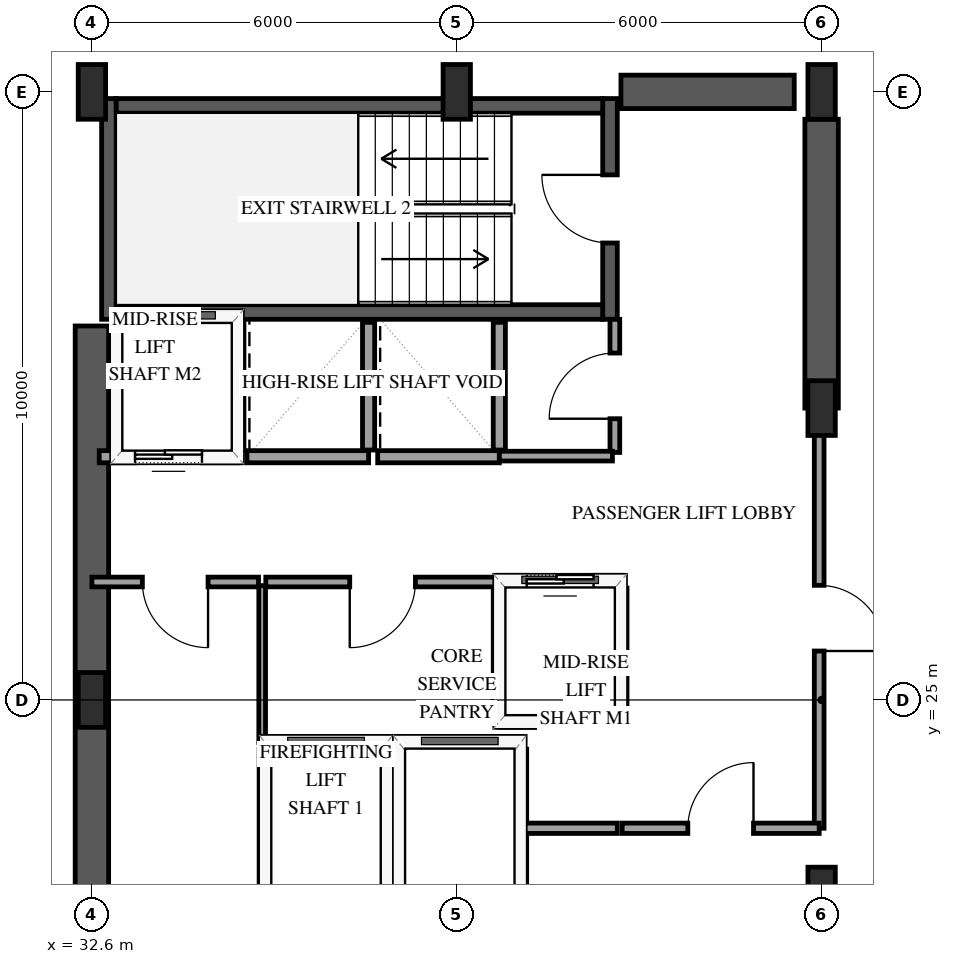
"""IFC4 building model, lengths in metres.
Left out: names, types, materials, properties, quantities, classifications, styles, units other than length and angle.
Written with IfcOpenShell. Run it as: python <this file> out.ifc"""

import sys

from ifc_helpers import new_model, si_unit, direction, frame, frame_2d, origin, origin_2d, place, context, subcontext, project, spatial, rectangle, extrude, element, fill, save


model = new_model("IFC4")
c1 = context("Model", 3, precision=1e-05, world=origin(), true_north=direction((0.0, 1.0)))
c2 = subcontext(c1, "Body", "Model", "MODEL_VIEW")
j1 = project(units=[si_unit("LENGTHUNIT", "METRE"), si_unit("PLANEANGLEUNIT", "RADIAN")], contexts=[c1])
p1 = place(None, origin())
s1 = spatial("IfcSite", under=j1, at=p1, CompositionType="ELEMENT")
p2 = place(p1, origin())
s2 = spatial("IfcBuilding", under=s1, at=p2, CompositionType="ELEMENT")
p3 = place(p2, frame((0.0, 0.0, 178.6)))
s3 = spatial("IfcBuildingStorey", under=s2, at=p3, CompositionType="ELEMENT", Elevation=178.6)
p4 = place(p3, frame((32.88, 31.26, 0.0), z_axis=(0.0, 0.0, 1.0), x_axis=(0.0, 1.0, 0.0)))
e1 = element("IfcWall", 1, at=p4, inside=s3, PredefinedType="SHEAR", context=c2, shape_type="SweptSolid", body=[
    extrude(rectangle(XDim=3.63, YDim=0.24, at=frame_2d((1.815, 0.0))), origin(), (0.0, 0.0, 1.0), 3.6),
])
p5 = place(p3, frame((41.12, 31.26, 0.0), z_axis=(0.0, 0.0, 1.0), x_axis=(0.0, 1.0, 0.0)))
e2 = element("IfcWall", 2, at=p5, inside=s3, PredefinedType="SHEAR", context=c2, shape_type="SweptSolid", body=[
    extrude(rectangle(XDim=3.63, YDim=0.24, at=frame_2d((1.815, 0.0))), origin(), (0.0, 0.0, 1.0), 3.6),
])
p6 = place(p5, frame((1.255, 0.0, 0.0)))
e3 = element("IfcOpeningElement", 3, at=p6, cuts=e2, PredefinedType="OPENING", context=c2, shape_type="SweptSolid", body=[
    extrude(rectangle(XDim=1.12, YDim=2.15, at=frame_2d((0.56, 1.075))), frame((0.0, 0.13, 0.0), z_axis=(0.0, -1.0, 0.0), x_axis=(1.0, 0.0, 0.0)), (0.0, 0.0, 1.0), 0.26),
])
for number, where, z_axis, x_axis in (
    (4, (33.0, 31.38, 0.0), (0.0, 0.0, 1.0), (1.0, 0.0, 0.0)),
    (5, (33.0, 34.77, 0.0), (0.0, 0.0, 1.0), (1.0, 0.0, 0.0)),
):
    element("IfcWall", number, at=place(p3, frame(where, z_axis=z_axis, x_axis=x_axis)), inside=s3, PredefinedType="SHEAR", context=c2, shape_type="SweptSolid", body=[
        extrude(rectangle(XDim=8.0, YDim=0.24, at=frame_2d((4.0, 0.0))), origin(), (0.0, 0.0, 1.0), 3.6),
    ])
p7 = place(p3, frame((32.6, 18.85, 0.0), z_axis=(0.0, 0.0, 1.0), x_axis=(0.0, 1.0, 0.0)))
e6 = element("IfcWall", 6, at=p7, inside=s3, PredefinedType="SHEAR", context=c2, shape_type="SweptSolid", body=[
    extrude(rectangle(XDim=12.3, YDim=0.55, at=frame_2d((6.15, 0.0))), origin(), (0.0, 0.0, 1.0), 3.6),
])
p8 = place(p3, frame((41.3, 35.0, 0.0), z_axis=(0.0, 0.0, 1.0), x_axis=(1.0, 0.0, 0.0)))
e7 = element("IfcWall", 7, at=p8, inside=s3, PredefinedType="SHEAR", context=c2, shape_type="SweptSolid", body=[
    extrude(rectangle(XDim=2.85, YDim=0.55, at=frame_2d((1.425, 0.0))), origin(), (0.0, 0.0, 1.0), 3.6),
])
p9 = place(p3, frame((44.6, 29.8, 0.0), z_axis=(0.0, 0.0, 1.0), x_axis=(0.0, 1.0, 0.0)))
e8 = element("IfcWall", 8, at=p9, inside=s3, PredefinedType="SHEAR", context=c2, shape_type="SweptSolid", body=[
    extrude(rectangle(XDim=4.75, YDim=0.55, at=frame_2d((2.375, 0.0))), origin(), (0.0, 0.0, 1.0), 3.6),
])
for number, where, z_axis, x_axis in (
    (9, (32.6, 25.0, 0.0), (0.0, 0.0, 1.0), (1.0, 0.0, 0.0)),
    (10, (32.6, 35.0, 0.0), (0.0, 0.0, 1.0), (1.0, 0.0, 0.0)),
    (11, (38.6, 35.0, 0.0), (0.0, 0.0, 1.0), (1.0, 0.0, 0.0)),
    (12, (44.6, 21.8, 0.0), (0.0, 0.0, 1.0), (1.0, 0.0, 0.0)),
    (13, (44.6, 29.8, 0.0), (0.0, 0.0, 1.0), (1.0, 0.0, 0.0)),
    (14, (44.6, 35.0, 0.0), (0.0, 0.0, 1.0), (1.0, 0.0, 0.0)),
):
    element("IfcColumn", number, at=place(p3, frame(where, z_axis=z_axis, x_axis=x_axis)), inside=s3, PredefinedType="PILASTER", context=c2, shape_type="SweptSolid", body=[
        extrude(rectangle(XDim=0.45, YDim=0.9, at=origin_2d()), origin(), (0.0, 0.0, 1.0), 3.6),
    ])
p10 = place(p3, frame((35.45, 24.3, 0.0), z_axis=(0.0, 0.0, 1.0), x_axis=(1.0, 0.0, 0.0)))
e15 = element("IfcWall", 15, at=p10, inside=s3, PredefinedType="SOLIDWALL", context=c2, shape_type="SweptSolid", body=[
    extrude(rectangle(XDim=2.0, YDim=0.2, at=frame_2d((1.0, 0.0))), origin(), (0.0, 0.0, 1.0), 3.3),
])
for number, where, z_axis, x_axis in (
    (16, (35.45, 21.81, 0.0), (0.0, 0.0, 1.0), (0.0, 1.0, 0.0)),
    (17, (37.45, 21.81, 0.0), (0.0, 0.0, 1.0), (0.0, 1.0, 0.0)),
):
    element("IfcWall", number, at=place(p3, frame(where, z_axis=z_axis, x_axis=x_axis)), inside=s3, PredefinedType="SOLIDWALL", context=c2, shape_type="SweptSolid", body=[
        extrude(rectangle(XDim=2.38, YDim=0.2, at=frame_2d((1.19, 0.0))), origin(), (0.0, 0.0, 1.0), 3.3),
    ])
p11 = place(p3, frame((37.65, 24.3, 0.0), z_axis=(0.0, 0.0, 1.0), x_axis=(1.0, 0.0, 0.0)))
e18 = element("IfcWall", 18, at=p11, inside=s3, PredefinedType="SOLIDWALL", context=c2, shape_type="SweptSolid", body=[
    extrude(rectangle(XDim=2.0, YDim=0.2, at=frame_2d((1.0, 0.0))), origin(), (0.0, 0.0, 1.0), 3.3),
])
p12 = place(p3, frame((39.65, 21.81, 0.0), z_axis=(0.0, 0.0, 1.0), x_axis=(0.0, 1.0, 0.0)))
e19 = element("IfcWall", 19, at=p12, inside=s3, PredefinedType="SOLIDWALL", context=c2, shape_type="SweptSolid", body=[
    extrude(rectangle(XDim=2.38, YDim=0.2, at=frame_2d((1.19, 0.0))), origin(), (0.0, 0.0, 1.0), 3.3),
])
p13 = place(p3, frame((39.3, 24.65, 0.0), z_axis=(0.0, 0.0, 1.0), x_axis=(1.0, 0.0, 0.0)))
e20 = element("IfcWall", 20, at=p13, inside=s3, PredefinedType="SOLIDWALL", context=c2, shape_type="SweptSolid", body=[
    extrude(rectangle(XDim=2.0, YDim=0.2, at=frame_2d((1.0, 0.0))), origin(), (0.0, 0.0, 1.0), 3.3),
])
p14 = place(p3, frame((39.3, 26.95, 0.0), z_axis=(0.0, 0.0, 1.0), x_axis=(1.0, 0.0, 0.0)))
e21 = element("IfcWall", 21, at=p14, inside=s3, PredefinedType="SOLIDWALL", context=c2, shape_type="SweptSolid", body=[
    extrude(rectangle(XDim=2.0, YDim=0.2, at=frame_2d((1.0, 0.0))), origin(), (0.0, 0.0, 1.0), 3.3),
])
p15 = place(p14, frame((0.45, 0.0, 0.0)))
e22 = element("IfcOpeningElement", 22, at=p15, cuts=e21, PredefinedType="OPENING", context=c2, shape_type="SweptSolid", body=[
    extrude(rectangle(XDim=1.1, YDim=2.15, at=frame_2d((0.55, 1.075))), frame((0.0, 0.11, 0.0), z_axis=(0.0, -1.0, 0.0), x_axis=(1.0, 0.0, 0.0)), (0.0, 0.0, 1.0), 0.22),
])
for number, where, z_axis, x_axis in (
    (23, (39.3, 24.76, 0.0), (0.0, 0.0, 1.0), (0.0, 1.0, 0.0)),
    (24, (41.3, 24.76, 0.0), (0.0, 0.0, 1.0), (0.0, 1.0, 0.0)),
):
    element("IfcWall", number, at=place(p3, frame(where, z_axis=z_axis, x_axis=x_axis)), inside=s3, PredefinedType="SOLIDWALL", context=c2, shape_type="SweptSolid", body=[
        extrude(rectangle(XDim=2.08, YDim=0.2, at=frame_2d((1.04, 0.0))), origin(), (0.0, 0.0, 1.0), 3.3),
    ])
p16 = place(p3, frame((32.72, 29.0, 0.0), z_axis=(0.0, 0.0, 1.0), x_axis=(1.0, 0.0, 0.0)))
e25 = element("IfcWall", 25, at=p16, inside=s3, PredefinedType="SOLIDWALL", context=c2, shape_type="SweptSolid", body=[
    extrude(rectangle(XDim=2.28, YDim=0.2, at=frame_2d((1.14, 0.0))), origin(), (0.0, 0.0, 1.0), 3.3),
])
p17 = place(p16, frame((0.59, 0.0, 0.0)))
e26 = element("IfcOpeningElement", 26, at=p17, cuts=e25, PredefinedType="OPENING", context=c2, shape_type="SweptSolid", body=[
    extrude(rectangle(XDim=1.1, YDim=2.15, at=frame_2d((0.55, 1.075))), frame((0.0, 0.11, 0.0), z_axis=(0.0, -1.0, 0.0), x_axis=(1.0, 0.0, 0.0)), (0.0, 0.0, 1.0), 0.22),
])
p18 = place(p3, frame((35.0, 29.11, 0.0), z_axis=(0.0, 0.0, 1.0), x_axis=(0.0, 1.0, 0.0)))
e27 = element("IfcWall", 27, at=p18, inside=s3, PredefinedType="SOLIDWALL", context=c2, shape_type="SweptSolid", body=[
    extrude(rectangle(XDim=2.1, YDim=0.2, at=frame_2d((1.05, 0.0))), origin(), (0.0, 0.0, 1.0), 3.3),
])
p19 = place(p3, frame((35.15, 29.0, 0.0), z_axis=(0.0, 0.0, 1.0), x_axis=(1.0, 0.0, 0.0)))
e28 = element("IfcWall", 28, at=p19, inside=s3, PredefinedType="SOLIDWALL", context=c2, shape_type="SweptSolid", body=[
    extrude(rectangle(XDim=2.0, YDim=0.2, at=frame_2d((1.0, 0.0))), origin(), (0.0, 0.0, 1.0), 3.3),
])
p20 = place(p3, frame((37.15, 29.11, 0.0), z_axis=(0.0, 0.0, 1.0), x_axis=(0.0, 1.0, 0.0)))
e29 = element("IfcWall", 29, at=p20, inside=s3, PredefinedType="SOLIDWALL", context=c2, shape_type="SweptSolid", body=[
    extrude(rectangle(XDim=2.1, YDim=0.2, at=frame_2d((1.05, 0.0))), origin(), (0.0, 0.0, 1.0), 3.3),
])
p21 = place(p3, frame((37.3, 29.0, 0.0), z_axis=(0.0, 0.0, 1.0), x_axis=(1.0, 0.0, 0.0)))
e30 = element("IfcWall", 30, at=p21, inside=s3, PredefinedType="SOLIDWALL", context=c2, shape_type="SweptSolid", body=[
    extrude(rectangle(XDim=2.0, YDim=0.2, at=frame_2d((1.0, 0.0))), origin(), (0.0, 0.0, 1.0), 3.3),
])
p22 = place(p3, frame((39.3, 29.11, 0.0), z_axis=(0.0, 0.0, 1.0), x_axis=(0.0, 1.0, 0.0)))
e31 = element("IfcWall", 31, at=p22, inside=s3, PredefinedType="SOLIDWALL", context=c2, shape_type="SweptSolid", body=[
    extrude(rectangle(XDim=2.1, YDim=0.2, at=frame_2d((1.05, 0.0))), origin(), (0.0, 0.0, 1.0), 3.3),
])
p23 = place(p3, frame((44.56, 29.8, 0.0), z_axis=(0.0, 0.0, 1.0), x_axis=(0.0, -1.0, 0.0)))
e32 = element("IfcWall", 32, at=p23, inside=s3, PredefinedType="PARTITIONING", context=c2, shape_type="SweptSolid", body=[
    extrude(rectangle(XDim=6.91, YDim=0.16, at=frame_2d((3.455, 0.0))), origin(), (0.0, 0.0, 1.0), 2.34),
])
p24 = place(p23, frame((2.915, 0.0, 0.0)))
e33 = element("IfcOpeningElement", 33, at=p24, cuts=e32, PredefinedType="OPENING", context=c2, shape_type="SweptSolid", body=[
    extrude(rectangle(XDim=1.08, YDim=2.15, at=frame_2d((0.54, 1.075))), frame((0.0, 0.09, 0.0), z_axis=(0.0, -1.0, 0.0), x_axis=(1.0, 0.0, 0.0)), (0.0, 0.0, 1.0), 0.18),
])
p25 = place(p3, frame((39.3, 26.94, 0.0), z_axis=(0.0, 0.0, 1.0), x_axis=(-1.0, 0.0, 0.0)))
e34 = element("IfcWall", 34, at=p25, inside=s3, PredefinedType="PARTITIONING", context=c2, shape_type="SweptSolid", body=[
    extrude(rectangle(XDim=3.84, YDim=0.16, at=frame_2d((1.92, 0.0))), origin(), (0.0, 0.0, 1.0), 3.3),
])
p26 = place(p25, frame((1.38, 0.0, 0.0)))
e35 = element("IfcOpeningElement", 35, at=p26, cuts=e34, PredefinedType="OPENING", context=c2, shape_type="SweptSolid", body=[
    extrude(rectangle(XDim=1.08, YDim=2.15, at=frame_2d((0.54, 1.075))), frame((0.0, 0.09, 0.0), z_axis=(0.0, -1.0, 0.0), x_axis=(1.0, 0.0, 0.0)), (0.0, 0.0, 1.0), 0.18),
])
p27 = place(p3, frame((41.32, 22.89, 0.0), z_axis=(0.0, 0.0, 1.0), x_axis=(1.0, 0.0, 0.0)))
e36 = element("IfcWall", 36, at=p27, inside=s3, PredefinedType="PARTITIONING", context=c2, shape_type="SweptSolid", body=[
    extrude(rectangle(XDim=3.24, YDim=0.17, at=frame_2d((1.62, 0.0))), origin(), (0.0, 0.0, 1.0), 3.3),
])
p28 = place(p27, frame((1.08, 0.0, 0.0)))
e37 = element("IfcOpeningElement", 37, at=p28, cuts=e36, PredefinedType="OPENING", context=c2, shape_type="SweptSolid", body=[
    extrude(rectangle(XDim=1.08, YDim=2.15, at=frame_2d((0.54, 1.075))), frame((0.0, 0.095, 0.0), z_axis=(0.0, -1.0, 0.0), x_axis=(1.0, 0.0, 0.0)), (0.0, 0.0, 1.0), 0.19),
])
p29 = place(p3, frame((35.34, 26.94, 0.0), z_axis=(0.0, 0.0, 1.0), x_axis=(-1.0, 0.0, 0.0)))
e38 = element("IfcWall", 38, at=p29, inside=s3, PredefinedType="PARTITIONING", context=c2, shape_type="SweptSolid", body=[
    extrude(rectangle(XDim=2.74, YDim=0.16, at=frame_2d((1.37, 0.0))), origin(), (0.0, 0.0, 1.0), 3.3),
])
p30 = place(p29, frame((0.83, 0.0, 0.0)))
e39 = element("IfcOpeningElement", 39, at=p30, cuts=e38, PredefinedType="OPENING", context=c2, shape_type="SweptSolid", body=[
    extrude(rectangle(XDim=1.08, YDim=2.15, at=frame_2d((0.54, 1.075))), frame((0.0, 0.09, 0.0), z_axis=(0.0, -1.0, 0.0), x_axis=(1.0, 0.0, 0.0)), (0.0, 0.0, 1.0), 0.18),
])
p31 = place(p3, frame((35.4, 26.88, 0.0), z_axis=(0.0, 0.0, 1.0), x_axis=(0.0, -1.0, 0.0)))
e40 = element("IfcWall", 40, at=p31, inside=s3, PredefinedType="PARTITIONING", context=c2, shape_type="SweptSolid", body=[
    extrude(rectangle(XDim=2.58, YDim=0.11, at=frame_2d((1.29, 0.0))), origin(), (0.0, 0.0, 1.0), 3.3),
])
p32 = place(p3, frame((41.2, 29.07, 0.0), z_axis=(0.0, 0.0, 1.0), x_axis=(0.0, 1.0, 0.0)))
e41 = element("IfcWall", 41, at=p32, inside=s3, PredefinedType="PARTITIONING", context=c2, shape_type="SweptSolid", body=[
    extrude(rectangle(XDim=2.19, YDim=0.16, at=frame_2d((1.095, 0.0))), origin(), (0.0, 0.0, 1.0), 3.3),
])
p33 = place(p32, frame((0.555, 0.0, 0.0)))
e42 = element("IfcOpeningElement", 42, at=p33, cuts=e41, PredefinedType="OPENING", context=c2, shape_type="SweptSolid", body=[
    extrude(rectangle(XDim=1.08, YDim=2.15, at=frame_2d((0.54, 1.075))), frame((0.0, 0.09, 0.0), z_axis=(0.0, -1.0, 0.0), x_axis=(1.0, 0.0, 0.0)), (0.0, 0.0, 1.0), 0.18),
])
p34 = place(p3, frame((39.3, 29.01, 0.0), z_axis=(0.0, 0.0, 1.0), x_axis=(1.0, 0.0, 0.0)))
e43 = element("IfcWall", 43, at=p34, inside=s3, PredefinedType="PARTITIONING", context=c2, shape_type="SweptSolid", body=[
    extrude(rectangle(XDim=1.86, YDim=0.16, at=frame_2d((0.93, 0.0))), origin(), (0.0, 0.0, 1.0), 3.3),
])
p35 = place(p3, frame((39.72, 22.89, 0.0), z_axis=(0.0, 0.0, 1.0), x_axis=(1.0, 0.0, 0.0)))
e44 = element("IfcWall", 44, at=p35, inside=s3, PredefinedType="PARTITIONING", context=c2, shape_type="SweptSolid", body=[
    extrude(rectangle(XDim=1.52, YDim=0.17, at=frame_2d((0.76, 0.0))), origin(), (0.0, 0.0, 1.0), 3.3),
])
p36 = place(p15, origin())
e45 = element("IfcDoor", 45, at=p36, inside=s3, OperationType="SLIDING_TO_LEFT", PredefinedType="DOOR", context=c2, shape_type="SweptSolid", body=[
    extrude(rectangle(XDim=1.1, YDim=2.15, at=frame_2d((0.55, 1.075))), frame((0.0, 0.025, 0.0), z_axis=(0.0, -1.0, 0.0), x_axis=(1.0, 0.0, 0.0)), (0.0, 0.0, 1.0), 0.05),
])
fill(e22, e45)
p37 = place(p17, origin())
e46 = element("IfcDoor", 46, at=p37, inside=s3, OperationType="SLIDING_TO_LEFT", PredefinedType="DOOR", context=c2, shape_type="SweptSolid", body=[
    extrude(rectangle(XDim=1.1, YDim=2.15, at=frame_2d((0.55, 1.075))), frame((0.0, 0.025, 0.0), z_axis=(0.0, -1.0, 0.0), x_axis=(1.0, 0.0, 0.0)), (0.0, 0.0, 1.0), 0.05),
])
fill(e26, e46)
p38 = place(p6, origin())
e47 = element("IfcDoor", 47, at=p38, inside=s3, OperationType="SINGLE_SWING_RIGHT", PredefinedType="DOOR", context=c2, shape_type="SweptSolid", body=[
    extrude(rectangle(XDim=1.12, YDim=2.15, at=frame_2d((0.56, 1.075))), frame((0.0, 0.025, 0.0), z_axis=(0.0, -1.0, 0.0), x_axis=(1.0, 0.0, 0.0)), (0.0, 0.0, 1.0), 0.05),
])
fill(e3, e47)
p39 = place(p24, origin())
e48 = element("IfcDoor", 48, at=p39, inside=s3, OperationType="SINGLE_SWING_RIGHT", PredefinedType="DOOR", context=c2, shape_type="SweptSolid", body=[
    extrude(rectangle(XDim=1.08, YDim=2.15, at=frame_2d((0.54, 1.075))), frame((0.0, 0.025, 0.0), z_axis=(0.0, -1.0, 0.0), x_axis=(1.0, 0.0, 0.0)), (0.0, 0.0, 1.0), 0.05),
])
fill(e33, e48)
p40 = place(p26, origin())
e49 = element("IfcDoor", 49, at=p40, inside=s3, OperationType="SINGLE_SWING_RIGHT", PredefinedType="DOOR", context=c2, shape_type="SweptSolid", body=[
    extrude(rectangle(XDim=1.08, YDim=2.15, at=frame_2d((0.54, 1.075))), frame((0.0, 0.025, 0.0), z_axis=(0.0, -1.0, 0.0), x_axis=(1.0, 0.0, 0.0)), (0.0, 0.0, 1.0), 0.05),
])
fill(e35, e49)
p41 = place(p28, origin())
e50 = element("IfcDoor", 50, at=p41, inside=s3, OperationType="SINGLE_SWING_RIGHT", PredefinedType="DOOR", context=c2, shape_type="SweptSolid", body=[
    extrude(rectangle(XDim=1.08, YDim=2.15, at=frame_2d((0.54, 1.075))), frame((0.0, 0.025, 0.0), z_axis=(0.0, -1.0, 0.0), x_axis=(1.0, 0.0, 0.0)), (0.0, 0.0, 1.0), 0.05),
])
fill(e37, e50)
p42 = place(p30, origin())
e51 = element("IfcDoor", 51, at=p42, inside=s3, OperationType="SINGLE_SWING_LEFT", PredefinedType="DOOR", context=c2, shape_type="SweptSolid", body=[
    extrude(rectangle(XDim=1.08, YDim=2.15, at=frame_2d((0.54, 1.075))), frame((0.0, 0.025, 0.0), z_axis=(0.0, -1.0, 0.0), x_axis=(1.0, 0.0, 0.0)), (0.0, 0.0, 1.0), 0.05),
])
fill(e39, e51)
p43 = place(p33, origin())
e52 = element("IfcDoor", 52, at=p43, inside=s3, OperationType="SINGLE_SWING_LEFT", PredefinedType="DOOR", context=c2, shape_type="SweptSolid", body=[
    extrude(rectangle(XDim=1.08, YDim=2.15, at=frame_2d((0.54, 1.075))), frame((0.0, 0.025, 0.0), z_axis=(0.0, -1.0, 0.0), x_axis=(1.0, 0.0, 0.0)), (0.0, 0.0, 1.0), 0.05),
])
fill(e42, e52)
save(model, sys.argv[1])
